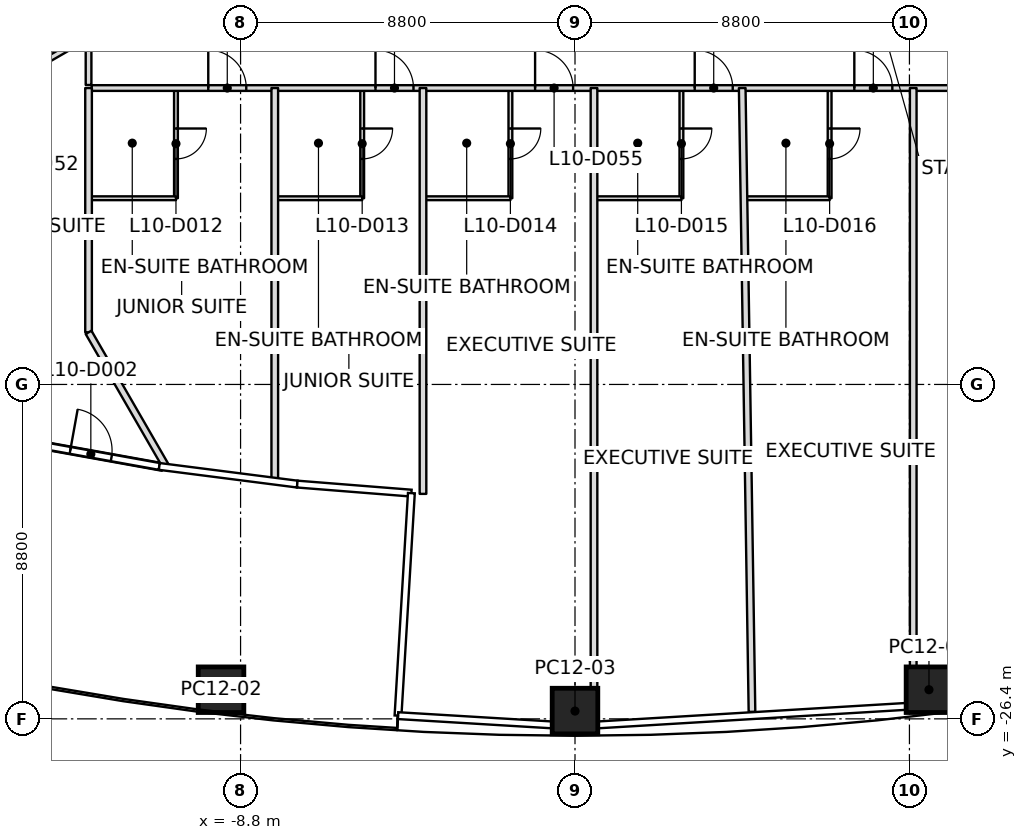
"""IFC4 building model, lengths in metres.
Left out: names, types, materials, properties, quantities, classifications, styles, units other than length and angle.
Written with IfcOpenShell. Run it as: python <this file> out.ifc"""

import sys

from ifc_helpers import new_model, si_unit, direction, frame, frame_2d, origin, origin_2d, place, context, subcontext, project, spatial, rectangle, extrude, element, fill, save


model = new_model("IFC4")
c1 = context("Model", 3, precision=1e-05, world=origin(), true_north=direction((0.0, 1.0)))
c2 = subcontext(c1, "Body", "Model", "MODEL_VIEW")
j1 = project(units=[si_unit("LENGTHUNIT", "METRE"), si_unit("PLANEANGLEUNIT", "RADIAN")], contexts=[c1])
p1 = place(None, origin())
s1 = spatial("IfcSite", under=j1, at=p1, CompositionType="ELEMENT")
p2 = place(p1, origin())
s2 = spatial("IfcBuilding", under=s1, at=p2, CompositionType="ELEMENT")
p3 = place(p2, frame((0.0, 0.0, 59.1)))
s3 = spatial("IfcBuildingStorey", under=s2, at=p3, CompositionType="ELEMENT", Elevation=59.1)
p4 = place(p3, frame((-9.314, -25.633, 0.0), z_axis=(0.009390084537, 0.223303928158, 0.974703638026), x_axis=(0.986945932523, -0.158794334949, 0.026871647957)))
e1 = element("IfcColumn", 1, at=p4, inside=s3, PredefinedType="COLUMN", context=c2, shape_type="SweptSolid", body=[
    extrude(rectangle(XDim=1.2, YDim=1.2, at=origin_2d()), origin(), (0.0, 0.0, 1.0), 3.796),
])
p5 = place(p3, frame((0.0, -26.195, 0.0), z_axis=(0.0, 0.23868906442, 0.971096045984), x_axis=(-1.0, 0.0, 0.0)))
e2 = element("IfcColumn", 2, at=p5, inside=s3, PredefinedType="COLUMN", context=c2, shape_type="SweptSolid", body=[
    extrude(rectangle(XDim=1.2, YDim=1.2, at=origin_2d()), origin(), (0.0, 0.0, 1.0), 3.81),
])
p6 = place(p3, frame((9.314, -25.633, 0.0), z_axis=(-0.009390084537, 0.223303928158, 0.974703638026), x_axis=(-0.986945932523, -0.158794334949, 0.026871647957)))
e3 = element("IfcColumn", 3, at=p6, inside=s3, PredefinedType="COLUMN", context=c2, shape_type="SweptSolid", body=[
    extrude(rectangle(XDim=1.2, YDim=1.2, at=origin_2d()), origin(), (0.0, 0.0, 1.0), 3.796),
])
p7 = place(p3, frame((-14.63, -19.092, 0.0), z_axis=(0.0, 0.0, 1.0), x_axis=(0.984154491202, -0.177313105682, 0.0)))
e4 = element("IfcWall", 4, at=p7, inside=s3, PredefinedType="SOLIDWALL", context=c2, shape_type="SweptSolid", body=[
    extrude(rectangle(XDim=3.84, YDim=0.2, at=frame_2d((1.92, 0.0))), origin(), (0.0, 0.0, 1.0), 2.947),
])
p8 = place(p7, frame((1.37, 0.0, 0.0)))
e5 = element("IfcOpeningElement", 5, at=p8, cuts=e4, PredefinedType="OPENING", context=c2, shape_type="SweptSolid", body=[
    extrude(rectangle(XDim=1.1, YDim=2.1, at=frame_2d((0.55, 1.05))), frame((0.0, 0.1, 0.0), z_axis=(0.0, -1.0, 0.0), x_axis=(1.0, 0.0, 0.0)), (0.0, 0.0, 1.0), 0.2),
])
p9 = place(p3, frame((-12.8, -9.8, 0.0), z_axis=(0.0, 0.0, 1.0), x_axis=(0.0, -1.0, 0.0)))
e6 = element("IfcWall", 6, at=p9, inside=s3, PredefinedType="PARTITIONING", context=c2, shape_type="SweptSolid", body=[
    extrude(rectangle(XDim=6.429, YDim=0.175, at=frame_2d((3.215, 0.0))), origin(), (0.0, 0.0, 1.0), 3.15),
])
p10 = place(p3, frame((-12.8, -16.229, 0.0), z_axis=(0.0, 0.0, 1.0), x_axis=(0.500009043062, -0.866020182707, 0.0)))
e7 = element("IfcWall", 7, at=p10, inside=s3, PredefinedType="PARTITIONING", context=c2, shape_type="SweptSolid", body=[
    extrude(rectangle(XDim=4.105, YDim=0.175, at=frame_2d((2.052, 0.0))), origin(), (0.0, 0.0, 1.0), 2.947),
])
p11 = place(p3, frame((-7.9, -9.8, 0.0), z_axis=(0.0, 0.0, 1.0), x_axis=(0.0, -1.0, 0.0)))
e8 = element("IfcWall", 8, at=p11, inside=s3, PredefinedType="PARTITIONING", context=c2, shape_type="SweptSolid", body=[
    extrude(rectangle(XDim=10.354, YDim=0.175, at=frame_2d((5.177, 0.0))), origin(), (0.0, 0.0, 1.0), 3.15),
])
p12 = place(p3, frame((-4.0, -9.8, 0.0), z_axis=(0.0, 0.0, 1.0), x_axis=(0.0, -1.0, 0.0)))
e9 = element("IfcWall", 9, at=p12, inside=s3, PredefinedType="PARTITIONING", context=c2, shape_type="SweptSolid", body=[
    extrude(rectangle(XDim=10.679, YDim=0.175, at=frame_2d((5.34, 0.0))), origin(), (0.0, 0.0, 1.0), 3.15),
])
p13 = place(p3, frame((0.5, -9.8, 0.0), z_axis=(0.0, 0.0, 1.0), x_axis=(0.0, -1.0, 0.0)))
e10 = element("IfcWall", 10, at=p13, inside=s3, PredefinedType="PARTITIONING", context=c2, shape_type="SweptSolid", body=[
    extrude(rectangle(XDim=16.919, YDim=0.175, at=frame_2d((8.459, 0.0))), origin(), (0.0, 0.0, 1.0), 2.934),
])
p14 = place(p3, frame((4.4, -9.8, 0.0), z_axis=(0.0, 0.0, 1.0), x_axis=(0.015658866924, -0.999877392427, 0.0)))
e11 = element("IfcWall", 11, at=p14, inside=s3, PredefinedType="PARTITIONING", context=c2, shape_type="SweptSolid", body=[
    extrude(rectangle(XDim=16.417, YDim=0.175, at=frame_2d((8.209, 0.0))), origin(), (0.0, 0.0, 1.0), 2.934),
])
p15 = place(p3, frame((8.9, -9.8, 0.0), z_axis=(0.0, 0.0, 1.0), x_axis=(0.0, -1.0, 0.0)))
e12 = element("IfcWall", 12, at=p15, inside=s3, PredefinedType="PARTITIONING", context=c2, shape_type="SweptSolid", body=[
    extrude(rectangle(XDim=16.409, YDim=0.175, at=frame_2d((8.205, 0.0))), origin(), (0.0, 0.0, 1.0), 3.15),
])
p16 = place(p3, frame((-12.8, -6.351, 0.0), z_axis=(0.0, 0.0, 1.0), x_axis=(-0.866024189303, -0.500002103537, 0.0)))
e13 = element("IfcWall", 13, at=p16, inside=s3, PredefinedType="PARTITIONING", context=c2, shape_type="SweptSolid", body=[
    extrude(rectangle(XDim=13.023, YDim=0.15, at=frame_2d((6.512, 0.0))), origin(), (0.0, 0.0, 1.0), 2.947),
])
p17 = place(p16, frame((3.052, 0.0, 0.0)))
e14 = element("IfcOpeningElement", 14, at=p17, cuts=e13, PredefinedType="OPENING", context=c2, shape_type="SweptSolid", body=[
    extrude(rectangle(XDim=1.0, YDim=2.1, at=frame_2d((0.5, 1.05))), frame((0.0, 0.075, 0.0), z_axis=(0.0, -1.0, 0.0), x_axis=(1.0, 0.0, 0.0)), (0.0, 0.0, 1.0), 0.15),
])
p18 = place(p16, frame((9.603, 0.0, 0.0)))
e15 = element("IfcOpeningElement", 15, at=p18, cuts=e13, PredefinedType="OPENING", context=c2, shape_type="SweptSolid", body=[
    extrude(rectangle(XDim=1.0, YDim=2.1, at=frame_2d((0.5, 1.05))), frame((0.0, 0.075, 0.0), z_axis=(0.0, -1.0, 0.0), x_axis=(1.0, 0.0, 0.0)), (0.0, 0.0, 1.0), 0.15),
])
p19 = place(p3, frame((-23.178, -14.421, 0.0), z_axis=(0.0, 0.0, 1.0), x_axis=(0.866017993231, 0.500012835235, 0.0)))
e16 = element("IfcWall", 16, at=p19, inside=s3, PredefinedType="PARTITIONING", context=c2, shape_type="SweptSolid", body=[
    extrude(rectangle(XDim=11.984, YDim=0.15, at=frame_2d((5.992, 0.0))), origin(), (0.0, 0.0, 1.0), 2.797),
])
p20 = place(p19, frame((1.252, 0.0, 0.0)))
e17 = element("IfcOpeningElement", 17, at=p20, cuts=e16, PredefinedType="OPENING", context=c2, shape_type="SweptSolid", body=[
    extrude(rectangle(XDim=1.0, YDim=2.1, at=frame_2d((0.5, 1.05))), frame((0.0, 0.075, 0.0), z_axis=(0.0, -1.0, 0.0), x_axis=(1.0, 0.0, 0.0)), (0.0, 0.0, 1.0), 0.15),
])
p21 = place(p19, frame((8.484, 0.0, 0.0)))
e18 = element("IfcOpeningElement", 18, at=p21, cuts=e16, PredefinedType="OPENING", context=c2, shape_type="SweptSolid", body=[
    extrude(rectangle(XDim=1.0, YDim=2.1, at=frame_2d((0.5, 1.05))), frame((0.0, 0.075, 0.0), z_axis=(0.0, -1.0, 0.0), x_axis=(1.0, 0.0, 0.0)), (0.0, 0.0, 1.0), 0.15),
])
p22 = place(p3, frame((-12.8, -8.521, 0.0), z_axis=(0.0, 0.0, 1.0), x_axis=(0.0, -1.0, 0.0)))
e19 = element("IfcWall", 19, at=p22, inside=s3, PredefinedType="PARTITIONING", context=c2, shape_type="SweptSolid", body=[
    extrude(rectangle(XDim=1.199, YDim=0.15, at=frame_2d((0.6, 0.0))), origin(), (0.0, 0.0, 1.0), 2.797),
])
p23 = place(p3, frame((-12.72, -9.8, 0.0), z_axis=(0.0, 0.0, 1.0), x_axis=(1.0, 0.0, 0.0)))
e20 = element("IfcWall", 20, at=p23, inside=s3, PredefinedType="PARTITIONING", context=c2, shape_type="SweptSolid", body=[
    extrude(rectangle(XDim=25.44, YDim=0.15, at=frame_2d((12.72, 0.0))), origin(), (0.0, 0.0, 1.0), 2.947),
])
p24 = place(p23, frame((3.07, 0.0, 0.0)))
e21 = element("IfcOpeningElement", 21, at=p24, cuts=e20, PredefinedType="OPENING", context=c2, shape_type="SweptSolid", body=[
    extrude(rectangle(XDim=1.0, YDim=2.1, at=frame_2d((0.5, 1.05))), frame((0.0, 0.075, 0.0), z_axis=(0.0, -1.0, 0.0), x_axis=(1.0, 0.0, 0.0)), (0.0, 0.0, 1.0), 0.15),
])
p25 = place(p23, frame((7.47, 0.0, 0.0)))
e22 = element("IfcOpeningElement", 22, at=p25, cuts=e20, PredefinedType="OPENING", context=c2, shape_type="SweptSolid", body=[
    extrude(rectangle(XDim=1.0, YDim=2.1, at=frame_2d((0.5, 1.05))), frame((0.0, 0.075, 0.0), z_axis=(0.0, -1.0, 0.0), x_axis=(1.0, 0.0, 0.0)), (0.0, 0.0, 1.0), 0.15),
])
p26 = place(p23, frame((11.67, 0.0, 0.0)))
e23 = element("IfcOpeningElement", 23, at=p26, cuts=e20, PredefinedType="OPENING", context=c2, shape_type="SweptSolid", body=[
    extrude(rectangle(XDim=1.0, YDim=2.1, at=frame_2d((0.5, 1.05))), frame((0.0, 0.075, 0.0), z_axis=(0.0, -1.0, 0.0), x_axis=(1.0, 0.0, 0.0)), (0.0, 0.0, 1.0), 0.15),
])
p27 = place(p23, frame((15.87, 0.0, 0.0)))
e24 = element("IfcOpeningElement", 24, at=p27, cuts=e20, PredefinedType="OPENING", context=c2, shape_type="SweptSolid", body=[
    extrude(rectangle(XDim=1.0, YDim=2.1, at=frame_2d((0.5, 1.05))), frame((0.0, 0.075, 0.0), z_axis=(0.0, -1.0, 0.0), x_axis=(1.0, 0.0, 0.0)), (0.0, 0.0, 1.0), 0.15),
])
p28 = place(p23, frame((20.07, 0.0, 0.0)))
e25 = element("IfcOpeningElement", 25, at=p28, cuts=e20, PredefinedType="OPENING", context=c2, shape_type="SweptSolid", body=[
    extrude(rectangle(XDim=1.0, YDim=2.1, at=frame_2d((0.5, 1.05))), frame((0.0, 0.075, 0.0), z_axis=(0.0, -1.0, 0.0), x_axis=(1.0, 0.0, 0.0)), (0.0, 0.0, 1.0), 0.15),
])
p29 = place(p3, frame((-10.5, -9.83, 0.0), z_axis=(0.0, 0.0, 1.0), x_axis=(0.0, -1.0, 0.0)))
e26 = element("IfcWall", 26, at=p29, inside=s3, PredefinedType="PARTITIONING", context=c2, shape_type="SweptSolid", body=[
    extrude(rectangle(XDim=2.87, YDim=0.1, at=frame_2d((1.435, 0.0))), origin(), (0.0, 0.0, 1.0), 3.15),
])
p30 = place(p29, frame((1.035, 0.0, 0.0)))
e27 = element("IfcOpeningElement", 27, at=p30, cuts=e26, PredefinedType="OPENING", context=c2, shape_type="SweptSolid", body=[
    extrude(rectangle(XDim=0.8, YDim=2.1, at=frame_2d((0.4, 1.05))), frame((0.0, 0.05, 0.0), z_axis=(0.0, -1.0, 0.0), x_axis=(1.0, 0.0, 0.0)), (0.0, 0.0, 1.0), 0.1),
])
p31 = place(p3, frame((-10.5, -12.7, 0.0), z_axis=(0.0, 0.0, 1.0), x_axis=(-1.0, 0.0, 0.0)))
e28 = element("IfcWall", 28, at=p31, inside=s3, PredefinedType="PARTITIONING", context=c2, shape_type="SweptSolid", body=[
    extrude(rectangle(XDim=2.27, YDim=0.1, at=frame_2d((1.135, 0.0))), origin(), (0.0, 0.0, 1.0), 2.947),
])
p32 = place(p3, frame((-5.6, -9.83, 0.0), z_axis=(0.0, 0.0, 1.0), x_axis=(0.0, -1.0, 0.0)))
e29 = element("IfcWall", 29, at=p32, inside=s3, PredefinedType="PARTITIONING", context=c2, shape_type="SweptSolid", body=[
    extrude(rectangle(XDim=2.87, YDim=0.1, at=frame_2d((1.435, 0.0))), origin(), (0.0, 0.0, 1.0), 3.15),
])
p33 = place(p32, frame((1.035, 0.0, 0.0)))
e30 = element("IfcOpeningElement", 30, at=p33, cuts=e29, PredefinedType="OPENING", context=c2, shape_type="SweptSolid", body=[
    extrude(rectangle(XDim=0.8, YDim=2.1, at=frame_2d((0.4, 1.05))), frame((0.0, 0.05, 0.0), z_axis=(0.0, -1.0, 0.0), x_axis=(1.0, 0.0, 0.0)), (0.0, 0.0, 1.0), 0.1),
])
p34 = place(p3, frame((-5.6, -12.7, 0.0), z_axis=(0.0, 0.0, 1.0), x_axis=(-1.0, 0.0, 0.0)))
e31 = element("IfcWall", 31, at=p34, inside=s3, PredefinedType="PARTITIONING", context=c2, shape_type="SweptSolid", body=[
    extrude(rectangle(XDim=2.27, YDim=0.1, at=frame_2d((1.135, 0.0))), origin(), (0.0, 0.0, 1.0), 2.947),
])
p35 = place(p3, frame((-1.7, -9.83, 0.0), z_axis=(0.0, 0.0, 1.0), x_axis=(0.0, -1.0, 0.0)))
e32 = element("IfcWall", 32, at=p35, inside=s3, PredefinedType="PARTITIONING", context=c2, shape_type="SweptSolid", body=[
    extrude(rectangle(XDim=2.87, YDim=0.1, at=frame_2d((1.435, 0.0))), origin(), (0.0, 0.0, 1.0), 3.15),
])
p36 = place(p35, frame((1.035, 0.0, 0.0)))
e33 = element("IfcOpeningElement", 33, at=p36, cuts=e32, PredefinedType="OPENING", context=c2, shape_type="SweptSolid", body=[
    extrude(rectangle(XDim=0.8, YDim=2.1, at=frame_2d((0.4, 1.05))), frame((0.0, 0.05, 0.0), z_axis=(0.0, -1.0, 0.0), x_axis=(1.0, 0.0, 0.0)), (0.0, 0.0, 1.0), 0.1),
])
p37 = place(p3, frame((-1.7, -12.7, 0.0), z_axis=(0.0, 0.0, 1.0), x_axis=(-1.0, 0.0, 0.0)))
e34 = element("IfcWall", 34, at=p37, inside=s3, PredefinedType="PARTITIONING", context=c2, shape_type="SweptSolid", body=[
    extrude(rectangle(XDim=2.27, YDim=0.1, at=frame_2d((1.135, 0.0))), origin(), (0.0, 0.0, 1.0), 2.947),
])
p38 = place(p3, frame((2.8, -9.83, 0.0), z_axis=(0.0, 0.0, 1.0), x_axis=(0.0, -1.0, 0.0)))
e35 = element("IfcWall", 35, at=p38, inside=s3, PredefinedType="PARTITIONING", context=c2, shape_type="SweptSolid", body=[
    extrude(rectangle(XDim=2.87, YDim=0.1, at=frame_2d((1.435, 0.0))), origin(), (0.0, 0.0, 1.0), 3.15),
])
p39 = place(p38, frame((1.035, 0.0, 0.0)))
e36 = element("IfcOpeningElement", 36, at=p39, cuts=e35, PredefinedType="OPENING", context=c2, shape_type="SweptSolid", body=[
    extrude(rectangle(XDim=0.8, YDim=2.1, at=frame_2d((0.4, 1.05))), frame((0.0, 0.05, 0.0), z_axis=(0.0, -1.0, 0.0), x_axis=(1.0, 0.0, 0.0)), (0.0, 0.0, 1.0), 0.1),
])
p40 = place(p3, frame((2.8, -12.7, 0.0), z_axis=(0.0, 0.0, 1.0), x_axis=(-1.0, 0.0, 0.0)))
e37 = element("IfcWall", 37, at=p40, inside=s3, PredefinedType="PARTITIONING", context=c2, shape_type="SweptSolid", body=[
    extrude(rectangle(XDim=2.27, YDim=0.1, at=frame_2d((1.135, 0.0))), origin(), (0.0, 0.0, 1.0), 3.15),
])
p41 = place(p3, frame((6.7, -9.83, 0.0), z_axis=(0.0, 0.0, 1.0), x_axis=(0.0, -1.0, 0.0)))
e38 = element("IfcWall", 38, at=p41, inside=s3, PredefinedType="PARTITIONING", context=c2, shape_type="SweptSolid", body=[
    extrude(rectangle(XDim=2.87, YDim=0.1, at=frame_2d((1.435, 0.0))), origin(), (0.0, 0.0, 1.0), 3.15),
])
p42 = place(p41, frame((1.035, 0.0, 0.0)))
e39 = element("IfcOpeningElement", 39, at=p42, cuts=e38, PredefinedType="OPENING", context=c2, shape_type="SweptSolid", body=[
    extrude(rectangle(XDim=0.8, YDim=2.1, at=frame_2d((0.4, 1.05))), frame((0.0, 0.05, 0.0), z_axis=(0.0, -1.0, 0.0), x_axis=(1.0, 0.0, 0.0)), (0.0, 0.0, 1.0), 0.1),
])
p43 = place(p3, frame((6.7, -12.7, 0.0), z_axis=(0.0, 0.0, 1.0), x_axis=(-1.0, 0.0, 0.0)))
e40 = element("IfcWall", 40, at=p43, inside=s3, PredefinedType="PARTITIONING", context=c2, shape_type="SweptSolid", body=[
    extrude(rectangle(XDim=2.27, YDim=0.1, at=frame_2d((1.135, 0.0))), origin(), (0.0, 0.0, 1.0), 2.947),
])
p44 = place(p8, origin())
e41 = element("IfcDoor", 41, at=p44, inside=s3, OperationType="SINGLE_SWING_RIGHT", PredefinedType="DOOR", context=c2, shape_type="SweptSolid", body=[
    extrude(rectangle(XDim=1.1, YDim=2.1, at=frame_2d((0.55, 1.05))), frame((0.0, 0.025, 0.0), z_axis=(0.0, -1.0, 0.0), x_axis=(1.0, 0.0, 0.0)), (0.0, 0.0, 1.0), 0.05),
])
fill(e5, e41)
p45 = place(p24, origin())
e42 = element("IfcDoor", 42, at=p45, inside=s3, OperationType="SINGLE_SWING_LEFT", PredefinedType="DOOR", context=c2, shape_type="SweptSolid", body=[
    extrude(rectangle(XDim=1.0, YDim=2.1, at=frame_2d((0.5, 1.05))), frame((0.0, 0.025, 0.0), z_axis=(0.0, -1.0, 0.0), x_axis=(1.0, 0.0, 0.0)), (0.0, 0.0, 1.0), 0.05),
])
fill(e21, e42)
p46 = place(p30, origin())
e43 = element("IfcDoor", 43, at=p46, inside=s3, OperationType="SINGLE_SWING_RIGHT", PredefinedType="DOOR", context=c2, shape_type="SweptSolid", body=[
    extrude(rectangle(XDim=0.8, YDim=2.1, at=frame_2d((0.4, 1.05))), frame((0.0, 0.025, 0.0), z_axis=(0.0, -1.0, 0.0), x_axis=(1.0, 0.0, 0.0)), (0.0, 0.0, 1.0), 0.05),
])
fill(e27, e43)
p47 = place(p25, origin())
e44 = element("IfcDoor", 44, at=p47, inside=s3, OperationType="SINGLE_SWING_LEFT", PredefinedType="DOOR", context=c2, shape_type="SweptSolid", body=[
    extrude(rectangle(XDim=1.0, YDim=2.1, at=frame_2d((0.5, 1.05))), frame((0.0, 0.025, 0.0), z_axis=(0.0, -1.0, 0.0), x_axis=(1.0, 0.0, 0.0)), (0.0, 0.0, 1.0), 0.05),
])
fill(e22, e44)
p48 = place(p33, origin())
e45 = element("IfcDoor", 45, at=p48, inside=s3, OperationType="SINGLE_SWING_RIGHT", PredefinedType="DOOR", context=c2, shape_type="SweptSolid", body=[
    extrude(rectangle(XDim=0.8, YDim=2.1, at=frame_2d((0.4, 1.05))), frame((0.0, 0.025, 0.0), z_axis=(0.0, -1.0, 0.0), x_axis=(1.0, 0.0, 0.0)), (0.0, 0.0, 1.0), 0.05),
])
fill(e30, e45)
p49 = place(p26, origin())
e46 = element("IfcDoor", 46, at=p49, inside=s3, OperationType="SINGLE_SWING_LEFT", PredefinedType="DOOR", context=c2, shape_type="SweptSolid", body=[
    extrude(rectangle(XDim=1.0, YDim=2.1, at=frame_2d((0.5, 1.05))), frame((0.0, 0.025, 0.0), z_axis=(0.0, -1.0, 0.0), x_axis=(1.0, 0.0, 0.0)), (0.0, 0.0, 1.0), 0.05),
])
fill(e23, e46)
p50 = place(p36, origin())
e47 = element("IfcDoor", 47, at=p50, inside=s3, OperationType="SINGLE_SWING_LEFT", PredefinedType="DOOR", context=c2, shape_type="SweptSolid", body=[
    extrude(rectangle(XDim=0.8, YDim=2.1, at=frame_2d((0.4, 1.05))), frame((0.0, 0.025, 0.0), z_axis=(0.0, -1.0, 0.0), x_axis=(1.0, 0.0, 0.0)), (0.0, 0.0, 1.0), 0.05),
])
fill(e33, e47)
p51 = place(p27, origin())
e48 = element("IfcDoor", 48, at=p51, inside=s3, OperationType="SINGLE_SWING_LEFT", PredefinedType="DOOR", context=c2, shape_type="SweptSolid", body=[
    extrude(rectangle(XDim=1.0, YDim=2.1, at=frame_2d((0.5, 1.05))), frame((0.0, 0.025, 0.0), z_axis=(0.0, -1.0, 0.0), x_axis=(1.0, 0.0, 0.0)), (0.0, 0.0, 1.0), 0.05),
])
fill(e24, e48)
p52 = place(p39, origin())
e49 = element("IfcDoor", 49, at=p52, inside=s3, OperationType="SINGLE_SWING_LEFT", PredefinedType="DOOR", context=c2, shape_type="SweptSolid", body=[
    extrude(rectangle(XDim=0.8, YDim=2.1, at=frame_2d((0.4, 1.05))), frame((0.0, 0.025, 0.0), z_axis=(0.0, -1.0, 0.0), x_axis=(1.0, 0.0, 0.0)), (0.0, 0.0, 1.0), 0.05),
])
fill(e36, e49)
p53 = place(p28, origin())
e50 = element("IfcDoor", 50, at=p53, inside=s3, OperationType="SINGLE_SWING_LEFT", PredefinedType="DOOR", context=c2, shape_type="SweptSolid", body=[
    extrude(rectangle(XDim=1.0, YDim=2.1, at=frame_2d((0.5, 1.05))), frame((0.0, 0.025, 0.0), z_axis=(0.0, -1.0, 0.0), x_axis=(1.0, 0.0, 0.0)), (0.0, 0.0, 1.0), 0.05),
])
fill(e25, e50)
p54 = place(p42, origin())
e51 = element("IfcDoor", 51, at=p54, inside=s3, OperationType="SINGLE_SWING_LEFT", PredefinedType="DOOR", context=c2, shape_type="SweptSolid", body=[
    extrude(rectangle(XDim=0.8, YDim=2.1, at=frame_2d((0.4, 1.05))), frame((0.0, 0.025, 0.0), z_axis=(0.0, -1.0, 0.0), x_axis=(1.0, 0.0, 0.0)), (0.0, 0.0, 1.0), 0.05),
])
fill(e39, e51)
save(model, sys.argv[1])
